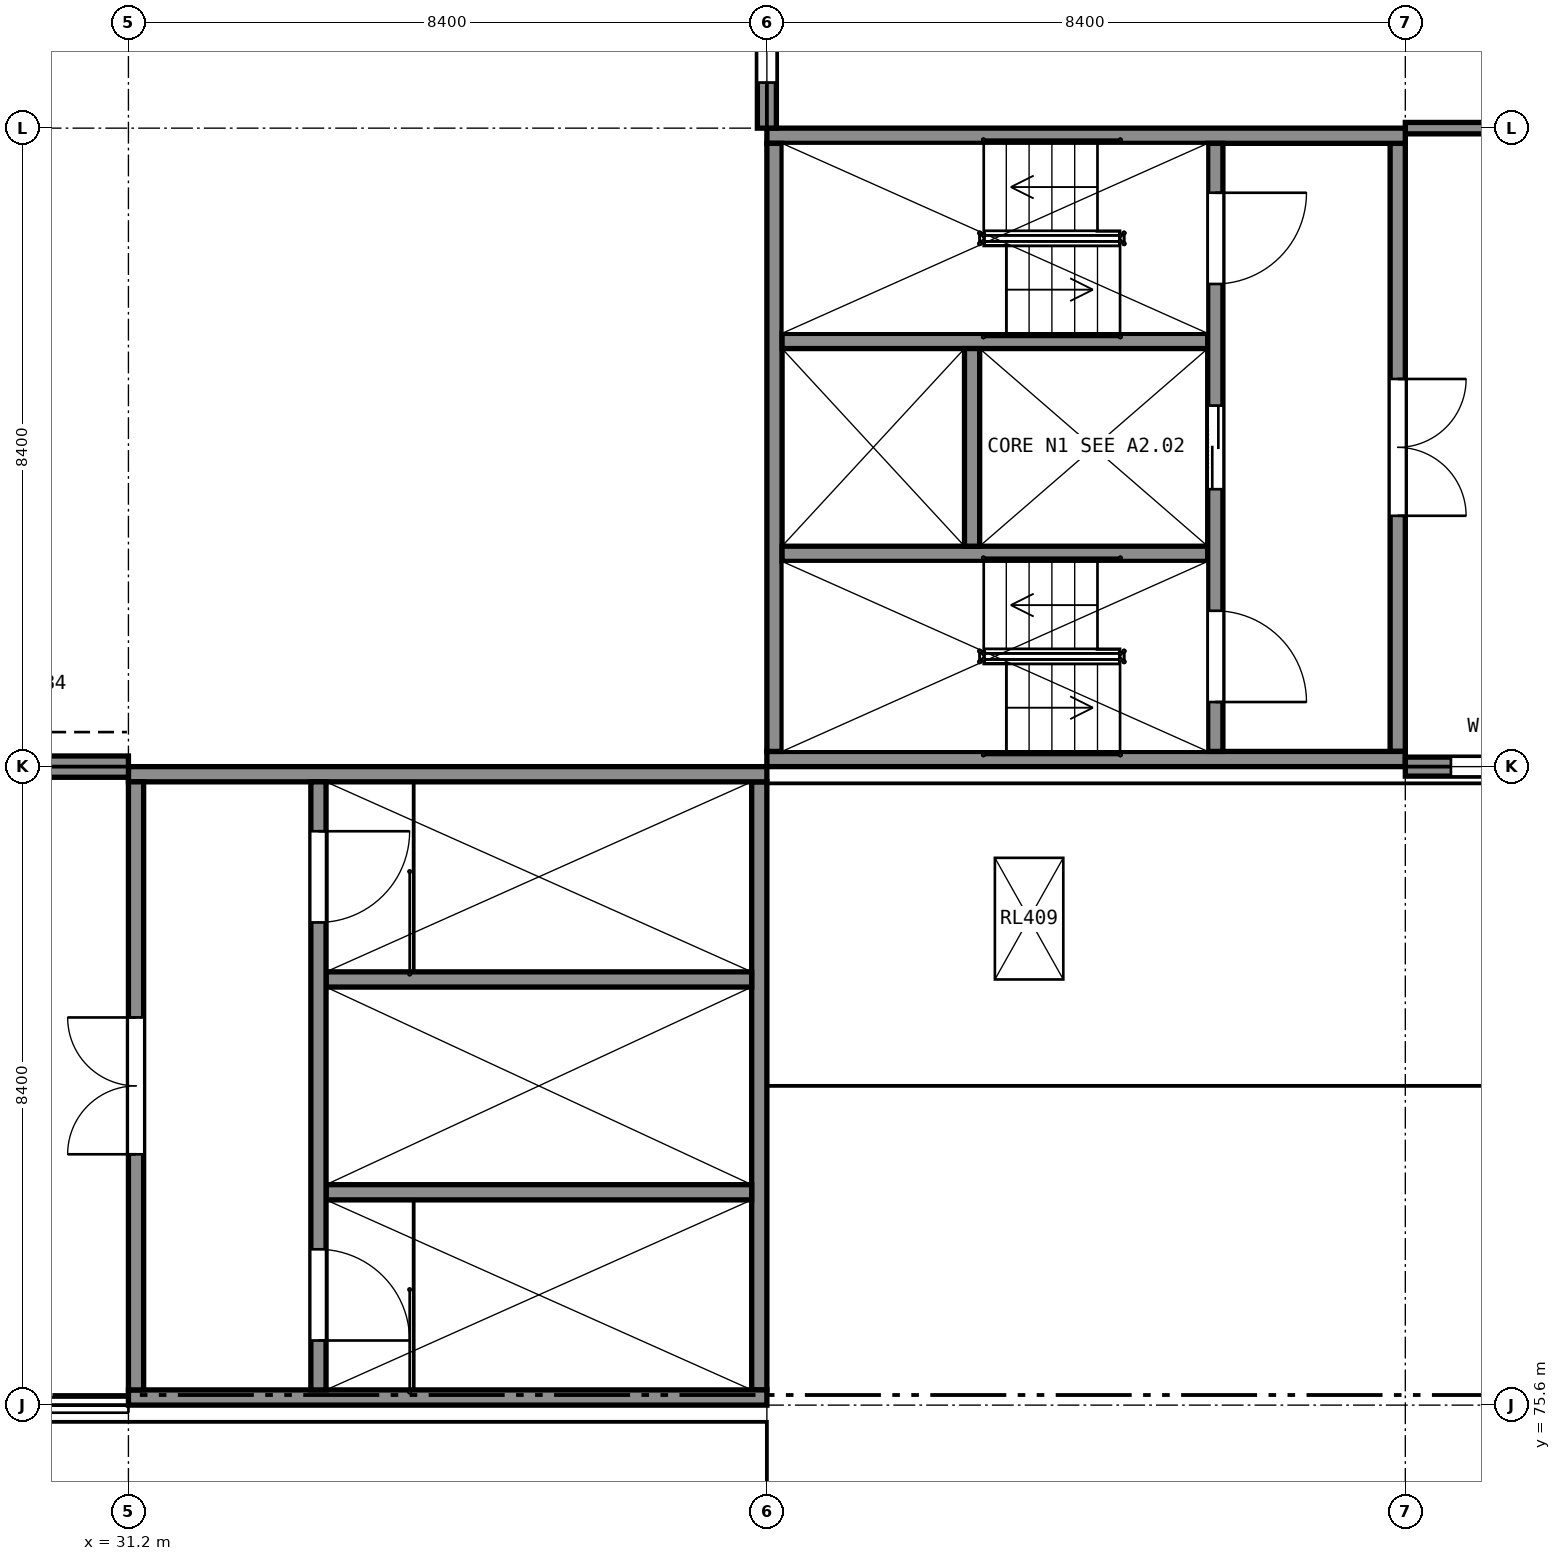
"""IFC4 building model, lengths in metres.
Left out: names, types, materials, properties, quantities, classifications, styles, units other than length and angle.
Written with IfcOpenShell. Run it as: python <this file> out.ifc"""

import sys

from ifc_helpers import new_model, si_unit, direction, frame, frame_2d, origin, origin_2d, place, context, subcontext, project, spatial, polyline, rectangle, outline, extrude, element, fill, save


model = new_model("IFC4")
c1 = context("Model", 3, precision=1e-05, world=origin(), true_north=direction((0.0, 1.0)))
c2 = subcontext(c1, "Body", "Model", "MODEL_VIEW")
j1 = project(units=[si_unit("LENGTHUNIT", "METRE"), si_unit("PLANEANGLEUNIT", "RADIAN")], contexts=[c1])
p1 = place(None, origin())
s1 = spatial("IfcSite", under=j1, at=p1, CompositionType="ELEMENT")
p2 = place(p1, origin())
s2 = spatial("IfcBuilding", under=s1, at=p2, CompositionType="ELEMENT")
p3 = place(p2, frame((0.0, 0.0, 5.5)))
s3 = spatial("IfcBuildingStorey", under=s2, at=p3, CompositionType="ELEMENT", Elevation=5.5)
p4 = place(p3, frame((31.2, 75.7, 0.0), z_axis=(0.0, 0.0, 1.0), x_axis=(1.0, 0.0, 0.0)))
e1 = element("IfcWall", 1, at=p4, inside=s3, PredefinedType="SHEAR", context=c2, shape_type="SweptSolid", body=[
    extrude(rectangle(XDim=8.4, YDim=0.2, at=frame_2d((4.2, 0.0))), origin(), (0.0, 0.0, 1.0), 5.625),
])
p5 = place(p3, frame((31.2, 83.9, 0.0), z_axis=(0.0, 0.0, 1.0), x_axis=(1.0, 0.0, 0.0)))
e2 = element("IfcWall", 2, at=p5, inside=s3, PredefinedType="SHEAR", context=c2, shape_type="SweptSolid", body=[
    extrude(rectangle(XDim=8.4, YDim=0.2, at=frame_2d((4.2, 0.0))), origin(), (0.0, 0.0, 1.0), 7.7),
])
p6 = place(p3, frame((31.3, 75.8, 0.0), z_axis=(0.0, 0.0, 1.0), x_axis=(0.0, 1.0, 0.0)))
e3 = element("IfcWall", 3, at=p6, inside=s3, PredefinedType="SHEAR", context=c2, shape_type="SweptSolid", body=[
    extrude(outline(polyline([(0.0, 0.0), (8.0, 0.0), (8.0, 7.674), (7.407, 7.524), (7.111, 7.45), (0.889, 5.875), (0.593, 5.801), (0.0, 5.651), (0.0, 0.0)])), frame((0.0, 0.1, 0.0), z_axis=(0.0, -1.0, 0.0), x_axis=(1.0, 0.0, 0.0)), (0.0, 0.0, 1.0), 0.2),
])
p7 = place(p6, frame((3.1, 0.0, 0.0)))
e4 = element("IfcOpeningElement", 4, at=p7, cuts=e3, PredefinedType="OPENING", context=c2, shape_type="SweptSolid", body=[
    extrude(rectangle(XDim=1.8, YDim=2.1, at=frame_2d((0.9, 1.05))), frame((0.0, 0.11, 0.0), z_axis=(0.0, -1.0, 0.0), x_axis=(1.0, 0.0, 0.0)), (0.0, 0.0, 1.0), 0.22),
])
p8 = place(p3, frame((39.5, 75.8, 0.0), z_axis=(0.0, 0.0, 1.0), x_axis=(0.0, 1.0, 0.0)))
e5 = element("IfcWall", 5, at=p8, inside=s3, PredefinedType="SHEAR", context=c2, shape_type="SweptSolid", body=[
    extrude(outline(polyline([(0.0, 0.0), (8.0, 0.0), (8.0, 7.674), (7.407, 7.524), (7.111, 7.45), (0.889, 5.875), (0.593, 5.801), (0.0, 5.651), (0.0, 0.0)])), frame((0.0, 0.1, 0.0), z_axis=(0.0, -1.0, 0.0), x_axis=(1.0, 0.0, 0.0)), (0.0, 0.0, 1.0), 0.2),
])
p9 = place(p3, frame((33.7, 75.8, 0.0), z_axis=(0.0, 0.0, 1.0), x_axis=(0.0, 1.0, 0.0)))
e6 = element("IfcWall", 6, at=p9, inside=s3, PredefinedType="SHEAR", context=c2, shape_type="SweptSolid", body=[
    extrude(outline(polyline([(0.0, 0.0), (8.0, 0.0), (8.0, 7.674), (7.407, 7.524), (7.111, 7.45), (0.889, 5.875), (0.593, 5.801), (0.0, 5.651), (0.0, 0.0)])), frame((0.0, 0.1, 0.0), z_axis=(0.0, -1.0, 0.0), x_axis=(1.0, 0.0, 0.0)), (0.0, 0.0, 1.0), 0.2),
])
p10 = place(p9, frame((0.65, 0.0, 0.0)))
e7 = element("IfcOpeningElement", 7, at=p10, cuts=e6, PredefinedType="OPENING", context=c2, shape_type="SweptSolid", body=[
    extrude(rectangle(XDim=1.2, YDim=2.1, at=frame_2d((0.6, 1.05))), frame((0.0, 0.11, 0.0), z_axis=(0.0, -1.0, 0.0), x_axis=(1.0, 0.0, 0.0)), (0.0, 0.0, 1.0), 0.22),
])
p11 = place(p9, frame((6.15, 0.0, 0.0)))
e8 = element("IfcOpeningElement", 8, at=p11, cuts=e6, PredefinedType="OPENING", context=c2, shape_type="SweptSolid", body=[
    extrude(rectangle(XDim=1.2, YDim=2.1, at=frame_2d((0.6, 1.05))), frame((0.0, 0.11, 0.0), z_axis=(0.0, -1.0, 0.0), x_axis=(1.0, 0.0, 0.0)), (0.0, 0.0, 1.0), 0.22),
])
p12 = place(p3, frame((33.8, 78.4, 0.0), z_axis=(0.0, 0.0, 1.0), x_axis=(1.0, 0.0, 0.0)))
e9 = element("IfcWall", 9, at=p12, inside=s3, PredefinedType="SHEAR", context=c2, shape_type="SweptSolid", body=[
    extrude(rectangle(XDim=5.6, YDim=0.2, at=frame_2d((2.8, 0.0))), origin(), (0.0, 0.0, 1.0), 6.308),
])
p13 = place(p3, frame((33.8, 81.2, 0.0), z_axis=(0.0, 0.0, 1.0), x_axis=(1.0, 0.0, 0.0)))
e10 = element("IfcWall", 10, at=p13, inside=s3, PredefinedType="SHEAR", context=c2, shape_type="SweptSolid", body=[
    extrude(rectangle(XDim=5.6, YDim=0.2, at=frame_2d((2.8, 0.0))), origin(), (0.0, 0.0, 1.0), 7.018),
])
for number, where, z_axis, x_axis in (
    (11, (39.6, 84.1, 0.0), (0.0, 0.0, 1.0), (1.0, 0.0, 0.0)),
    (12, (39.6, 92.3, 0.0), (0.0, 0.0, 1.0), (1.0, 0.0, 0.0)),
):
    element("IfcWall", number, at=place(p3, frame(where, z_axis=z_axis, x_axis=x_axis)), inside=s3, PredefinedType="SHEAR", context=c2, shape_type="SweptSolid", body=[
        extrude(rectangle(XDim=8.4, YDim=0.2, at=frame_2d((4.2, 0.0))), origin(), (0.0, 0.0, 1.0), 5.0),
    ])
p14 = place(p3, frame((39.7, 84.2, 0.0), z_axis=(0.0, 0.0, 1.0), x_axis=(0.0, 1.0, 0.0)))
e13 = element("IfcWall", 13, at=p14, inside=s3, PredefinedType="SHEAR", context=c2, shape_type="SweptSolid", body=[
    extrude(rectangle(XDim=8.0, YDim=0.2, at=frame_2d((4.0, 0.0))), origin(), (0.0, 0.0, 1.0), 5.0),
])
p15 = place(p3, frame((47.9, 84.2, 0.0), z_axis=(0.0, 0.0, 1.0), x_axis=(0.0, 1.0, 0.0)))
e14 = element("IfcWall", 14, at=p15, inside=s3, PredefinedType="SHEAR", context=c2, shape_type="SweptSolid", body=[
    extrude(rectangle(XDim=8.0, YDim=0.2, at=frame_2d((4.0, 0.0))), origin(), (0.0, 0.0, 1.0), 5.0),
])
p16 = place(p15, frame((3.1, 0.0, 0.0)))
e15 = element("IfcOpeningElement", 15, at=p16, cuts=e14, PredefinedType="OPENING", context=c2, shape_type="SweptSolid", body=[
    extrude(rectangle(XDim=1.8, YDim=2.1, at=frame_2d((0.9, 1.05))), frame((0.0, 0.11, 0.0), z_axis=(0.0, -1.0, 0.0), x_axis=(1.0, 0.0, 0.0)), (0.0, 0.0, 1.0), 0.22),
])
p17 = place(p3, frame((45.5, 84.2, 0.0), z_axis=(0.0, 0.0, 1.0), x_axis=(0.0, 1.0, 0.0)))
e16 = element("IfcWall", 16, at=p17, inside=s3, PredefinedType="SHEAR", context=c2, shape_type="SweptSolid", body=[
    extrude(rectangle(XDim=8.0, YDim=0.2, at=frame_2d((4.0, 0.0))), origin(), (0.0, 0.0, 1.0), 5.0),
])
p18 = place(p17, frame((0.65, 0.0, 0.0)))
e17 = element("IfcOpeningElement", 17, at=p18, cuts=e16, PredefinedType="OPENING", context=c2, shape_type="SweptSolid", body=[
    extrude(rectangle(XDim=1.2, YDim=2.1, at=frame_2d((0.6, 1.05))), frame((0.0, 0.11, 0.0), z_axis=(0.0, -1.0, 0.0), x_axis=(1.0, 0.0, 0.0)), (0.0, 0.0, 1.0), 0.22),
])
p19 = place(p17, frame((6.15, 0.0, 0.0)))
e18 = element("IfcOpeningElement", 18, at=p19, cuts=e16, PredefinedType="OPENING", context=c2, shape_type="SweptSolid", body=[
    extrude(rectangle(XDim=1.2, YDim=2.1, at=frame_2d((0.6, 1.05))), frame((0.0, 0.11, 0.0), z_axis=(0.0, -1.0, 0.0), x_axis=(1.0, 0.0, 0.0)), (0.0, 0.0, 1.0), 0.22),
])
p20 = place(p17, frame((3.45, 0.0, 0.0)))
e19 = element("IfcOpeningElement", 19, at=p20, cuts=e16, PredefinedType="OPENING", context=c2, shape_type="SweptSolid", body=[
    extrude(rectangle(XDim=1.1, YDim=2.1, at=frame_2d((0.55, 1.05))), frame((0.0, 0.11, 0.0), z_axis=(0.0, -1.0, 0.0), x_axis=(1.0, 0.0, 0.0)), (0.0, 0.0, 1.0), 0.22),
])
for number, where, z_axis, x_axis in (
    (20, (39.8, 86.8, 0.0), (0.0, 0.0, 1.0), (1.0, 0.0, 0.0)),
    (21, (39.8, 89.6, 0.0), (0.0, 0.0, 1.0), (1.0, 0.0, 0.0)),
):
    element("IfcWall", number, at=place(p3, frame(where, z_axis=z_axis, x_axis=x_axis)), inside=s3, PredefinedType="SHEAR", context=c2, shape_type="SweptSolid", body=[
        extrude(rectangle(XDim=5.6, YDim=0.2, at=frame_2d((2.8, 0.0))), origin(), (0.0, 0.0, 1.0), 5.0),
    ])
p21 = place(p3, frame((42.3, 86.9, 0.0), z_axis=(0.0, 0.0, 1.0), x_axis=(0.0, 1.0, 0.0)))
e22 = element("IfcWall", 22, at=p21, inside=s3, PredefinedType="SHEAR", context=c2, shape_type="SweptSolid", body=[
    extrude(rectangle(XDim=2.6, YDim=0.2, at=frame_2d((1.3, 0.0))), origin(), (0.0, 0.0, 1.0), 5.0),
])
p22 = place(p3, frame((23.2, 84.0, 0.0), z_axis=(0.0, 0.0, 1.0), x_axis=(1.0, 0.0, 0.0)))
e23 = element("IfcWall", 23, at=p22, inside=s3, PredefinedType="SOLIDWALL", context=c2, shape_type="SweptSolid", body=[
    extrude(rectangle(XDim=8.0, YDim=0.28, at=frame_2d((4.0, 0.0))), origin(), (0.0, 0.0, 1.0), 7.444),
])
p23 = place(p22, frame((1.05, 0.0, 1.2)))
e24 = element("IfcOpeningElement", 24, at=p23, cuts=e23, PredefinedType="OPENING", context=c2, shape_type="SweptSolid", body=[
    extrude(rectangle(XDim=0.3, YDim=3.0, at=frame_2d((0.15, 1.5))), frame((0.0, 0.15, 0.0), z_axis=(0.0, -1.0, 0.0), x_axis=(1.0, 0.0, 0.0)), (0.0, 0.0, 1.0), 0.3),
])
p24 = place(p22, frame((3.95, 0.0, 1.2)))
e25 = element("IfcOpeningElement", 25, at=p24, cuts=e23, PredefinedType="OPENING", context=c2, shape_type="SweptSolid", body=[
    extrude(rectangle(XDim=0.3, YDim=3.0, at=frame_2d((0.15, 1.5))), frame((0.0, 0.15, 0.0), z_axis=(0.0, -1.0, 0.0), x_axis=(1.0, 0.0, 0.0)), (0.0, 0.0, 1.0), 0.3),
])
p25 = place(p22, frame((6.65, 0.0, 1.2)))
e26 = element("IfcOpeningElement", 26, at=p25, cuts=e23, PredefinedType="OPENING", context=c2, shape_type="SweptSolid", body=[
    extrude(rectangle(XDim=0.3, YDim=3.0, at=frame_2d((0.15, 1.5))), frame((0.0, 0.15, 0.0), z_axis=(0.0, -1.0, 0.0), x_axis=(1.0, 0.0, 0.0)), (0.0, 0.0, 1.0), 0.3),
])
p26 = place(p22, frame((5.0, 0.0, 0.0)))
e27 = element("IfcOpeningElement", 27, at=p26, cuts=e23, PredefinedType="OPENING", context=c2, shape_type="SweptSolid", body=[
    extrude(rectangle(XDim=1.8, YDim=2.1, at=frame_2d((0.9, 1.05))), frame((0.0, 0.15, 0.0), z_axis=(0.0, -1.0, 0.0), x_axis=(1.0, 0.0, 0.0)), (0.0, 0.0, 1.0), 0.3),
])
p27 = place(p3, frame((39.6, 92.4, 0.0), z_axis=(0.0, 0.0, 1.0), x_axis=(0.0, 1.0, 0.0)))
e28 = element("IfcWall", 28, at=p27, inside=s3, PredefinedType="SOLIDWALL", context=c2, shape_type="SweptSolid", body=[
    extrude(rectangle(XDim=8.0, YDim=0.25, at=frame_2d((4.0, 0.0))), origin(), (0.0, 0.0, 1.0), 4.05),
])
p28 = place(p27, frame((0.6, 0.0, 0.9)))
e29 = element("IfcOpeningElement", 29, at=p28, cuts=e28, PredefinedType="OPENING", context=c2, shape_type="SweptSolid", body=[
    extrude(rectangle(XDim=1.2, YDim=2.1, at=frame_2d((0.6, 1.05))), frame((0.0, 0.135, 0.0), z_axis=(0.0, -1.0, 0.0), x_axis=(1.0, 0.0, 0.0)), (0.0, 0.0, 1.0), 0.27),
])
p29 = place(p27, frame((3.4, 0.0, 0.9)))
e30 = element("IfcOpeningElement", 30, at=p29, cuts=e28, PredefinedType="OPENING", context=c2, shape_type="SweptSolid", body=[
    extrude(rectangle(XDim=1.2, YDim=2.1, at=frame_2d((0.6, 1.05))), frame((0.0, 0.135, 0.0), z_axis=(0.0, -1.0, 0.0), x_axis=(1.0, 0.0, 0.0)), (0.0, 0.0, 1.0), 0.27),
])
p30 = place(p27, frame((6.2, 0.0, 0.9)))
e31 = element("IfcOpeningElement", 31, at=p30, cuts=e28, PredefinedType="OPENING", context=c2, shape_type="SweptSolid", body=[
    extrude(rectangle(XDim=1.2, YDim=2.1, at=frame_2d((0.6, 1.05))), frame((0.0, 0.135, 0.0), z_axis=(0.0, -1.0, 0.0), x_axis=(1.0, 0.0, 0.0)), (0.0, 0.0, 1.0), 0.27),
])
p31 = place(p3, frame((48.0, 84.0, 0.0), z_axis=(0.0, 0.0, 1.0), x_axis=(1.0, 0.0, 0.0)))
e32 = element("IfcWall", 32, at=p31, inside=s3, PredefinedType="SOLIDWALL", context=c2, shape_type="SweptSolid", body=[
    extrude(rectangle(XDim=8.0, YDim=0.25, at=frame_2d((4.0, 0.0))), origin(), (0.0, 0.0, 1.0), 3.94),
])
p32 = place(p31, frame((0.6, 0.0, 0.9)))
e33 = element("IfcOpeningElement", 33, at=p32, cuts=e32, PredefinedType="OPENING", context=c2, shape_type="SweptSolid", body=[
    extrude(rectangle(XDim=1.2, YDim=2.1, at=frame_2d((0.6, 1.05))), frame((0.0, 0.135, 0.0), z_axis=(0.0, -1.0, 0.0), x_axis=(1.0, 0.0, 0.0)), (0.0, 0.0, 1.0), 0.27),
])
p33 = place(p31, frame((3.4, 0.0, 0.9)))
e34 = element("IfcOpeningElement", 34, at=p33, cuts=e32, PredefinedType="OPENING", context=c2, shape_type="SweptSolid", body=[
    extrude(rectangle(XDim=1.2, YDim=2.1, at=frame_2d((0.6, 1.05))), frame((0.0, 0.135, 0.0), z_axis=(0.0, -1.0, 0.0), x_axis=(1.0, 0.0, 0.0)), (0.0, 0.0, 1.0), 0.27),
])
p34 = place(p31, frame((6.2, 0.0, 0.9)))
e35 = element("IfcOpeningElement", 35, at=p34, cuts=e32, PredefinedType="OPENING", context=c2, shape_type="SweptSolid", body=[
    extrude(rectangle(XDim=1.2, YDim=2.1, at=frame_2d((0.6, 1.05))), frame((0.0, 0.135, 0.0), z_axis=(0.0, -1.0, 0.0), x_axis=(1.0, 0.0, 0.0)), (0.0, 0.0, 1.0), 0.27),
])
p35 = place(p3, frame((48.0, 92.4, 0.0), z_axis=(0.0, 0.0, 1.0), x_axis=(1.0, 0.0, 0.0)))
e36 = element("IfcWall", 36, at=p35, inside=s3, PredefinedType="PARTITIONING", context=c2, shape_type="SweptSolid", body=[
    extrude(rectangle(XDim=8.0, YDim=0.15, at=frame_2d((4.0, 0.0))), origin(), (0.0, 0.0, 1.0), 3.9),
])
p36 = place(p35, frame((1.325, 0.0, 0.0)))
e37 = element("IfcOpeningElement", 37, at=p36, cuts=e36, PredefinedType="OPENING", context=c2, shape_type="SweptSolid", body=[
    extrude(rectangle(XDim=1.8, YDim=2.1, at=frame_2d((0.9, 1.05))), frame((0.0, 0.085, 0.0), z_axis=(0.0, -1.0, 0.0), x_axis=(1.0, 0.0, 0.0)), (0.0, 0.0, 1.0), 0.17),
])
p37 = place(p28, origin())
e38 = element("IfcWindow", 38, at=p37, inside=s3, PartitioningType="SINGLE_PANEL", PredefinedType="WINDOW", context=c2, shape_type="SweptSolid", body=[
    extrude(rectangle(XDim=1.2, YDim=2.1, at=frame_2d((0.6, 1.05))), frame((0.0, -0.045, 0.0), z_axis=(0.0, -1.0, 0.0), x_axis=(1.0, 0.0, 0.0)), (0.0, 0.0, 1.0), 0.06),
])
fill(e29, e38)
p38 = place(p32, origin())
e39 = element("IfcWindow", 39, at=p38, inside=s3, PartitioningType="SINGLE_PANEL", PredefinedType="WINDOW", context=c2, shape_type="SweptSolid", body=[
    extrude(rectangle(XDim=1.2, YDim=2.1, at=frame_2d((0.6, 1.05))), frame((0.0, 0.105, 0.0), z_axis=(0.0, -1.0, 0.0), x_axis=(1.0, 0.0, 0.0)), (0.0, 0.0, 1.0), 0.06),
])
fill(e33, e39)
p39 = place(p3, frame((0.0, 0.0, -0.25)))
p40 = place(p39, frame((43.05, 82.0, -0.01)))
p41 = place(p40, frame((0.0, 0.0, 0.21)))
e40 = element("IfcWindow", 40, at=p41, inside=s3, PartitioningType="SINGLE_PANEL", PredefinedType="SKYLIGHT", context=c2, shape_type="SweptSolid", body=[
    extrude(rectangle(XDim=0.9, YDim=1.6, at=origin_2d()), origin(), (0.0, 0.0, 1.0), 0.05),
])
p42 = place(p7, origin())
e41 = element("IfcDoor", 41, at=p42, inside=s3, OperationType="DOUBLE_DOOR_SINGLE_SWING", PredefinedType="DOOR", context=c2, shape_type="SweptSolid", body=[
    extrude(rectangle(XDim=1.8, YDim=2.1, at=frame_2d((0.9, 1.05))), frame((0.0, 0.025, 0.0), z_axis=(0.0, -1.0, 0.0), x_axis=(1.0, 0.0, 0.0)), (0.0, 0.0, 1.0), 0.05),
])
fill(e4, e41)
p43 = place(p10, origin())
e42 = element("IfcDoor", 42, at=p43, inside=s3, OperationType="SINGLE_SWING_LEFT", PredefinedType="DOOR", context=c2, shape_type="SweptSolid", body=[
    extrude(rectangle(XDim=1.2, YDim=2.1, at=frame_2d((0.6, 1.05))), frame((0.0, 0.025, 0.0), z_axis=(0.0, -1.0, 0.0), x_axis=(1.0, 0.0, 0.0)), (0.0, 0.0, 1.0), 0.05),
])
fill(e7, e42)
p44 = place(p11, origin())
e43 = element("IfcDoor", 43, at=p44, inside=s3, OperationType="SINGLE_SWING_RIGHT", PredefinedType="DOOR", context=c2, shape_type="SweptSolid", body=[
    extrude(rectangle(XDim=1.2, YDim=2.1, at=frame_2d((0.6, 1.05))), frame((0.0, 0.025, 0.0), z_axis=(0.0, -1.0, 0.0), x_axis=(1.0, 0.0, 0.0)), (0.0, 0.0, 1.0), 0.05),
])
fill(e8, e43)
p45 = place(p16, origin())
e44 = element("IfcDoor", 44, at=p45, inside=s3, OperationType="DOUBLE_DOOR_SINGLE_SWING", PredefinedType="DOOR", context=c2, shape_type="SweptSolid", body=[
    extrude(rectangle(XDim=1.8, YDim=2.1, at=frame_2d((0.9, 1.05))), frame((0.0, 0.025, 0.0), z_axis=(0.0, -1.0, 0.0), x_axis=(1.0, 0.0, 0.0)), (0.0, 0.0, 1.0), 0.05),
])
fill(e15, e44)
p46 = place(p18, origin())
e45 = element("IfcDoor", 45, at=p46, inside=s3, OperationType="SINGLE_SWING_LEFT", PredefinedType="DOOR", context=c2, shape_type="SweptSolid", body=[
    extrude(rectangle(XDim=1.2, YDim=2.1, at=frame_2d((0.6, 1.05))), frame((0.0, 0.025, 0.0), z_axis=(0.0, -1.0, 0.0), x_axis=(1.0, 0.0, 0.0)), (0.0, 0.0, 1.0), 0.05),
])
fill(e17, e45)
p47 = place(p19, origin())
e46 = element("IfcDoor", 46, at=p47, inside=s3, OperationType="SINGLE_SWING_RIGHT", PredefinedType="DOOR", context=c2, shape_type="SweptSolid", body=[
    extrude(rectangle(XDim=1.2, YDim=2.1, at=frame_2d((0.6, 1.05))), frame((0.0, 0.025, 0.0), z_axis=(0.0, -1.0, 0.0), x_axis=(1.0, 0.0, 0.0)), (0.0, 0.0, 1.0), 0.05),
])
fill(e18, e46)
p48 = place(p20, origin())
e47 = element("IfcDoor", 47, at=p48, inside=s3, OperationType="DOUBLE_DOOR_SLIDING", PredefinedType="DOOR", context=c2, shape_type="SweptSolid", body=[
    extrude(rectangle(XDim=1.1, YDim=2.1, at=frame_2d((0.55, 1.05))), frame((0.0, 0.025, 0.0), z_axis=(0.0, -1.0, 0.0), x_axis=(1.0, 0.0, 0.0)), (0.0, 0.0, 1.0), 0.05),
])
fill(e19, e47)
save(model, sys.argv[1])
